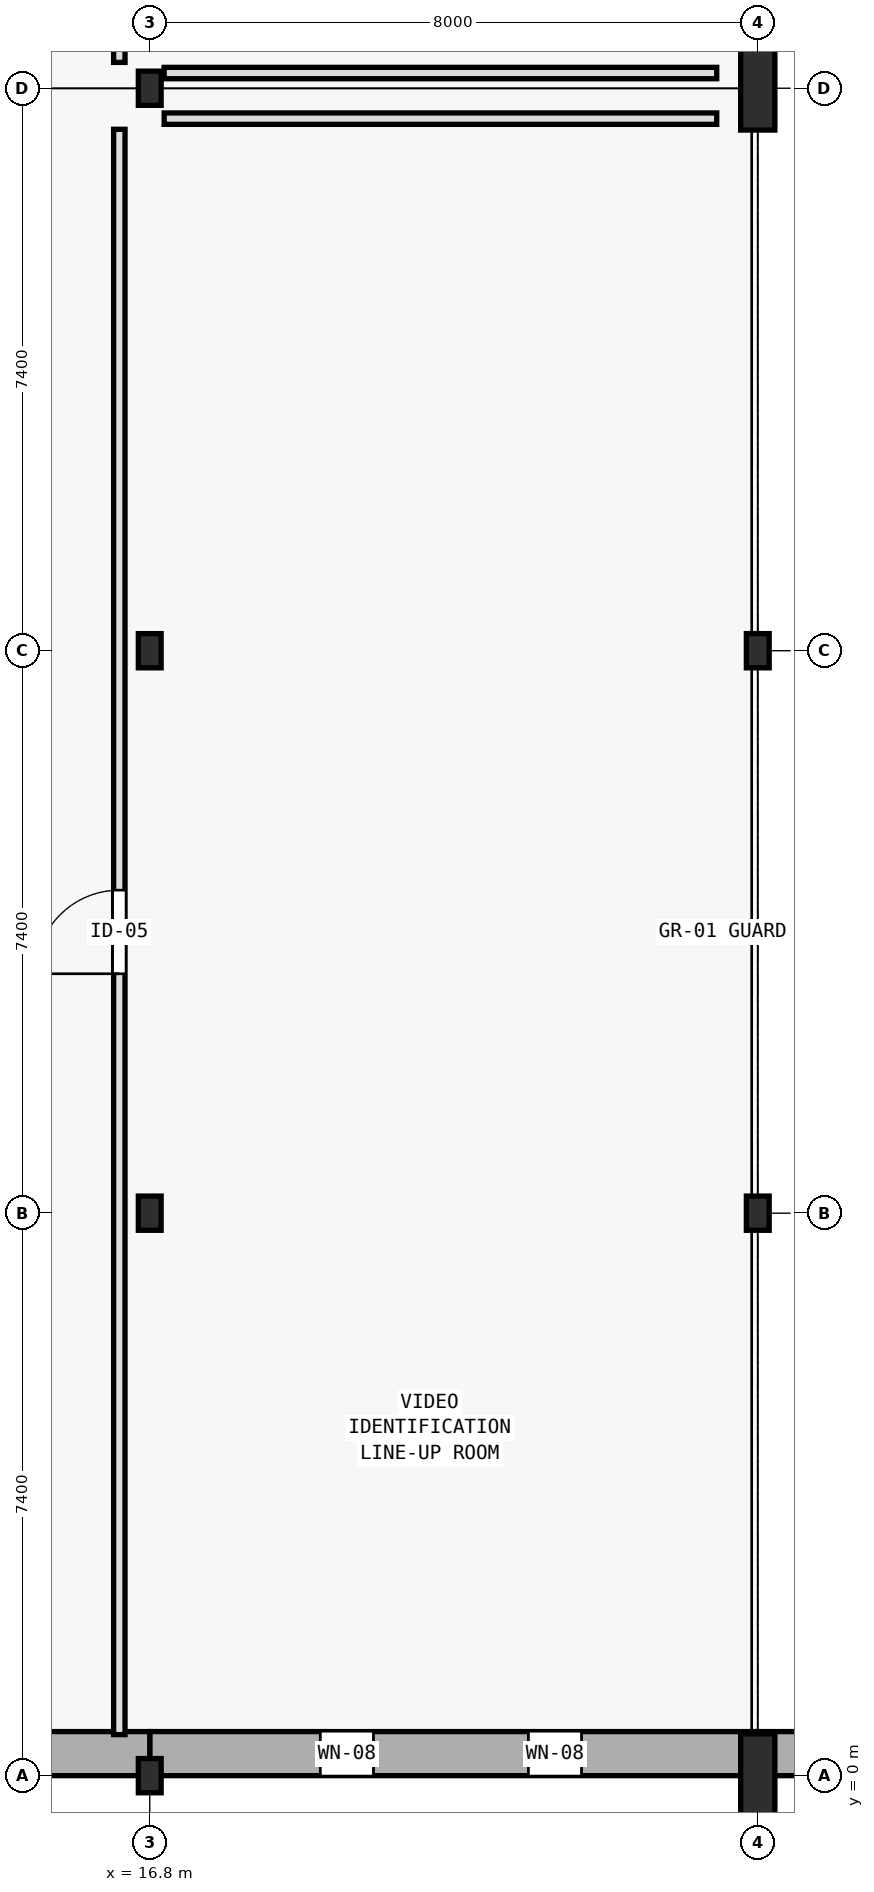
"""IFC4 building model, lengths in metres.
Left out: names, types, materials, properties, quantities, classifications, styles, units other than length and angle.
Written with IfcOpenShell. Run it as: python <this file> out.ifc"""

import sys

from ifc_helpers import new_model, si_unit, direction, frame, frame_2d, origin, origin_2d, place, context, subcontext, project, spatial, rectangle, i_section, extrude, element, fill, save


model = new_model("IFC4")
c1 = context("Model", 3, precision=1e-05, world=origin(), true_north=direction((0.0, 1.0)))
c2 = subcontext(c1, "Body", "Model", "MODEL_VIEW")
j1 = project(units=[si_unit("LENGTHUNIT", "METRE"), si_unit("PLANEANGLEUNIT", "RADIAN")], contexts=[c1])
p1 = place(None, origin())
s1 = spatial("IfcSite", under=j1, at=p1, CompositionType="ELEMENT")
p2 = place(p1, origin())
s2 = spatial("IfcBuilding", under=s1, at=p2, CompositionType="ELEMENT")
p3 = place(p2, frame((0.0, 0.0, 5.4)))
s3 = spatial("IfcBuildingStorey", under=s2, at=p3, CompositionType="ELEMENT", Elevation=5.4)
for number, where, z_axis, x_axis in (
    (1, (16.8, 0.0, 0.0), (0.0, 0.0, 1.0), (1.0, 0.0, 0.0)),
    (2, (16.8, 7.4, 0.0), (0.0, 0.0, 1.0), (1.0, 0.0, 0.0)),
    (3, (16.8, 14.8, 0.0), (0.0, 0.0, 1.0), (1.0, 0.0, 0.0)),
    (4, (16.8, 22.2, 0.0), (0.0, 0.0, 1.0), (1.0, 0.0, 0.0)),
):
    element("IfcColumn", number, at=place(p3, frame(where, z_axis=z_axis, x_axis=x_axis)), inside=s3, PredefinedType="COLUMN", context=c2, shape_type="SweptSolid", body=[
        extrude(i_section(OverallWidth=0.3, OverallDepth=0.45, WebThickness=0.014, FlangeThickness=0.026, FilletRadius=0.027, at=origin_2d()), origin(), (0.0, 0.0, 1.0), 4.5),
    ])
p4 = place(p3, frame((24.8, 0.0, 0.0), z_axis=(0.0, 0.0, 1.0), x_axis=(1.0, 0.0, 0.0)))
e5 = element("IfcColumn", 5, at=p4, inside=s3, PredefinedType="PILASTER", context=c2, shape_type="SweptSolid", body=[
    extrude(rectangle(XDim=0.45, YDim=1.1, at=origin_2d()), origin(), (0.0, 0.0, 1.0), 4.5),
])
for number, where, z_axis, x_axis in (
    (6, (24.8, 7.4, 0.0), (0.0, 0.0, 1.0), (1.0, 0.0, 0.0)),
    (7, (24.8, 14.8, 0.0), (0.0, 0.0, 1.0), (1.0, 0.0, 0.0)),
):
    element("IfcColumn", number, at=place(p3, frame(where, z_axis=z_axis, x_axis=x_axis)), inside=s3, PredefinedType="COLUMN", context=c2, shape_type="SweptSolid", body=[
        extrude(i_section(OverallWidth=0.3, OverallDepth=0.45, WebThickness=0.014, FlangeThickness=0.026, FilletRadius=0.027, at=origin_2d()), origin(), (0.0, 0.0, 1.0), 4.5),
    ])
p5 = place(p3, frame((24.8, 22.2, 0.0), z_axis=(0.0, 0.0, 1.0), x_axis=(1.0, 0.0, 0.0)))
e8 = element("IfcColumn", 8, at=p5, inside=s3, PredefinedType="PILASTER", context=c2, shape_type="SweptSolid", body=[
    extrude(rectangle(XDim=0.45, YDim=1.1, at=origin_2d()), origin(), (0.0, 0.0, 1.0), 4.5),
])
p6 = place(p3, frame((32.8, 0.29, 0.0), z_axis=(0.0, 0.0, 1.0), x_axis=(-1.0, 0.0, 0.0)))
e9 = element("IfcWall", 9, at=p6, inside=s3, PredefinedType="STANDARD", context=c2, shape_type="SweptSolid", body=[
    extrude(rectangle(XDim=8.0, YDim=0.58, at=frame_2d((4.0, 0.0))), origin(), (0.0, 0.0, 1.0), 4.5),
])
p7 = place(p6, frame((2.295, 0.0, 1.35)))
e10 = element("IfcOpeningElement", 10, at=p7, cuts=e9, PredefinedType="OPENING", context=c2, shape_type="SweptSolid", body=[
    extrude(rectangle(XDim=0.7, YDim=1.6, at=frame_2d((0.35, 0.8))), frame((0.0, 0.3, 0.0), z_axis=(0.0, -1.0, 0.0), x_axis=(1.0, 0.0, 0.0)), (0.0, 0.0, 1.0), 0.6),
])
p8 = place(p6, frame((5.005, 0.0, 1.35)))
e11 = element("IfcOpeningElement", 11, at=p8, cuts=e9, PredefinedType="OPENING", context=c2, shape_type="SweptSolid", body=[
    extrude(rectangle(XDim=0.7, YDim=1.6, at=frame_2d((0.35, 0.8))), frame((0.0, 0.3, 0.0), z_axis=(0.0, -1.0, 0.0), x_axis=(1.0, 0.0, 0.0)), (0.0, 0.0, 1.0), 0.6),
])
p9 = place(p3, frame((24.8, 0.29, 0.0), z_axis=(0.0, 0.0, 1.0), x_axis=(-1.0, 0.0, 0.0)))
e12 = element("IfcWall", 12, at=p9, inside=s3, PredefinedType="STANDARD", context=c2, shape_type="SweptSolid", body=[
    extrude(rectangle(XDim=8.0, YDim=0.58, at=frame_2d((4.0, 0.0))), origin(), (0.0, 0.0, 1.0), 4.5),
])
p10 = place(p9, frame((2.319, 0.0, 0.9)))
e13 = element("IfcOpeningElement", 13, at=p10, cuts=e12, PredefinedType="OPENING", context=c2, shape_type="SweptSolid", body=[
    extrude(rectangle(XDim=0.7, YDim=2.0, at=frame_2d((0.35, 1.0))), frame((0.0, 0.3, 0.0), z_axis=(0.0, -1.0, 0.0), x_axis=(1.0, 0.0, 0.0)), (0.0, 0.0, 1.0), 0.6),
])
p11 = place(p9, frame((5.056, 0.0, 0.9)))
e14 = element("IfcOpeningElement", 14, at=p11, cuts=e12, PredefinedType="OPENING", context=c2, shape_type="SweptSolid", body=[
    extrude(rectangle(XDim=0.7, YDim=2.0, at=frame_2d((0.35, 1.0))), frame((0.0, 0.3, 0.0), z_axis=(0.0, -1.0, 0.0), x_axis=(1.0, 0.0, 0.0)), (0.0, 0.0, 1.0), 0.6),
])
p12 = place(p3, frame((16.8, 0.29, 0.0), z_axis=(0.0, 0.0, 1.0), x_axis=(-1.0, 0.0, 0.0)))
e15 = element("IfcWall", 15, at=p12, inside=s3, PredefinedType="STANDARD", context=c2, shape_type="SweptSolid", body=[
    extrude(rectangle(XDim=8.0, YDim=0.58, at=frame_2d((4.0, 0.0))), origin(), (0.0, 0.0, 1.0), 4.5),
])
p13 = place(p12, frame((2.268, 0.0, 0.9)))
e16 = element("IfcOpeningElement", 16, at=p13, cuts=e15, PredefinedType="OPENING", context=c2, shape_type="SweptSolid", body=[
    extrude(rectangle(XDim=0.7, YDim=2.4, at=frame_2d((0.35, 1.2))), frame((0.0, 0.3, 0.0), z_axis=(0.0, -1.0, 0.0), x_axis=(1.0, 0.0, 0.0)), (0.0, 0.0, 1.0), 0.6),
])
p14 = place(p12, frame((5.032, 0.0, 0.9)))
e17 = element("IfcOpeningElement", 17, at=p14, cuts=e15, PredefinedType="OPENING", context=c2, shape_type="SweptSolid", body=[
    extrude(rectangle(XDim=0.7, YDim=2.4, at=frame_2d((0.35, 1.2))), frame((0.0, 0.3, 0.0), z_axis=(0.0, -1.0, 0.0), x_axis=(1.0, 0.0, 0.0)), (0.0, 0.0, 1.0), 0.6),
])
p15 = place(p3, frame((16.99, 21.8, 0.0), z_axis=(0.0, 0.0, 1.0), x_axis=(1.0, 0.0, 0.0)))
e18 = element("IfcWall", 18, at=p15, inside=s3, PredefinedType="PARTITIONING", context=c2, shape_type="SweptSolid", body=[
    extrude(rectangle(XDim=7.27, YDim=0.15, at=frame_2d((3.635, 0.0))), origin(), (0.0, 0.0, 1.0), 3.84),
])
p16 = place(p3, frame((16.4, 0.54, 0.0), z_axis=(0.0, 0.0, 1.0), x_axis=(0.0, 1.0, 0.0)))
e19 = element("IfcWall", 19, at=p16, inside=s3, PredefinedType="PARTITIONING", context=c2, shape_type="SweptSolid", body=[
    extrude(rectangle(XDim=21.12, YDim=0.15, at=frame_2d((10.56, 0.0))), origin(), (0.0, 0.0, 1.0), 3.65),
])
p17 = place(p16, frame((10.01, 0.0, 0.0)))
e20 = element("IfcOpeningElement", 20, at=p17, cuts=e19, PredefinedType="OPENING", context=c2, shape_type="SweptSolid", body=[
    extrude(rectangle(XDim=1.1, YDim=2.2, at=frame_2d((0.55, 1.1))), frame((0.0, 0.085, 0.0), z_axis=(0.0, -1.0, 0.0), x_axis=(1.0, 0.0, 0.0)), (0.0, 0.0, 1.0), 0.17),
])
p18 = place(p3, frame((16.99, 22.4, 0.0), z_axis=(0.0, 0.0, 1.0), x_axis=(1.0, 0.0, 0.0)))
e21 = element("IfcWall", 21, at=p18, inside=s3, PredefinedType="PARTITIONING", context=c2, shape_type="SweptSolid", body=[
    extrude(rectangle(XDim=7.27, YDim=0.15, at=frame_2d((3.635, 0.0))), origin(), (0.0, 0.0, 1.0), 3.65),
])
p19 = place(p3, frame((16.4, 22.54, 0.0), z_axis=(0.0, 0.0, 1.0), x_axis=(0.0, 1.0, 0.0)))
e22 = element("IfcWall", 22, at=p19, inside=s3, PredefinedType="PARTITIONING", context=c2, shape_type="SweptSolid", body=[
    extrude(rectangle(XDim=13.92, YDim=0.15, at=frame_2d((6.96, 0.0))), origin(), (0.0, 0.0, 1.0), 3.65),
])
p20 = place(p19, frame((4.372, 0.0, 0.0)))
e23 = element("IfcOpeningElement", 23, at=p20, cuts=e22, PredefinedType="OPENING", context=c2, shape_type="SweptSolid", body=[
    extrude(rectangle(XDim=1.0, YDim=2.2, at=frame_2d((0.5, 1.1))), frame((0.0, 0.085, 0.0), z_axis=(0.0, -1.0, 0.0), x_axis=(1.0, 0.0, 0.0)), (0.0, 0.0, 1.0), 0.17),
])
p21 = place(p10, origin())
e24 = element("IfcWindow", 24, at=p21, inside=s3, PartitioningType="SINGLE_PANEL", PredefinedType="WINDOW", context=c2, shape_type="SweptSolid", body=[
    extrude(rectangle(XDim=0.7, YDim=2.0, at=frame_2d((0.35, 1.0))), frame((0.0, 0.03, 0.0), z_axis=(0.0, -1.0, 0.0), x_axis=(1.0, 0.0, 0.0)), (0.0, 0.0, 1.0), 0.06),
])
fill(e13, e24)
p22 = place(p11, origin())
e25 = element("IfcWindow", 25, at=p22, inside=s3, PartitioningType="SINGLE_PANEL", PredefinedType="WINDOW", context=c2, shape_type="SweptSolid", body=[
    extrude(rectangle(XDim=0.7, YDim=2.0, at=frame_2d((0.35, 1.0))), frame((0.0, 0.03, 0.0), z_axis=(0.0, -1.0, 0.0), x_axis=(1.0, 0.0, 0.0)), (0.0, 0.0, 1.0), 0.06),
])
fill(e14, e25)
p23 = place(p17, origin())
e26 = element("IfcDoor", 26, at=p23, inside=s3, OperationType="SINGLE_SWING_LEFT", PredefinedType="DOOR", context=c2, shape_type="SweptSolid", body=[
    extrude(rectangle(XDim=1.1, YDim=2.2, at=frame_2d((0.55, 1.1))), frame((0.0, 0.025, 0.0), z_axis=(0.0, -1.0, 0.0), x_axis=(1.0, 0.0, 0.0)), (0.0, 0.0, 1.0), 0.05),
])
fill(e20, e26)
save(model, sys.argv[1])
